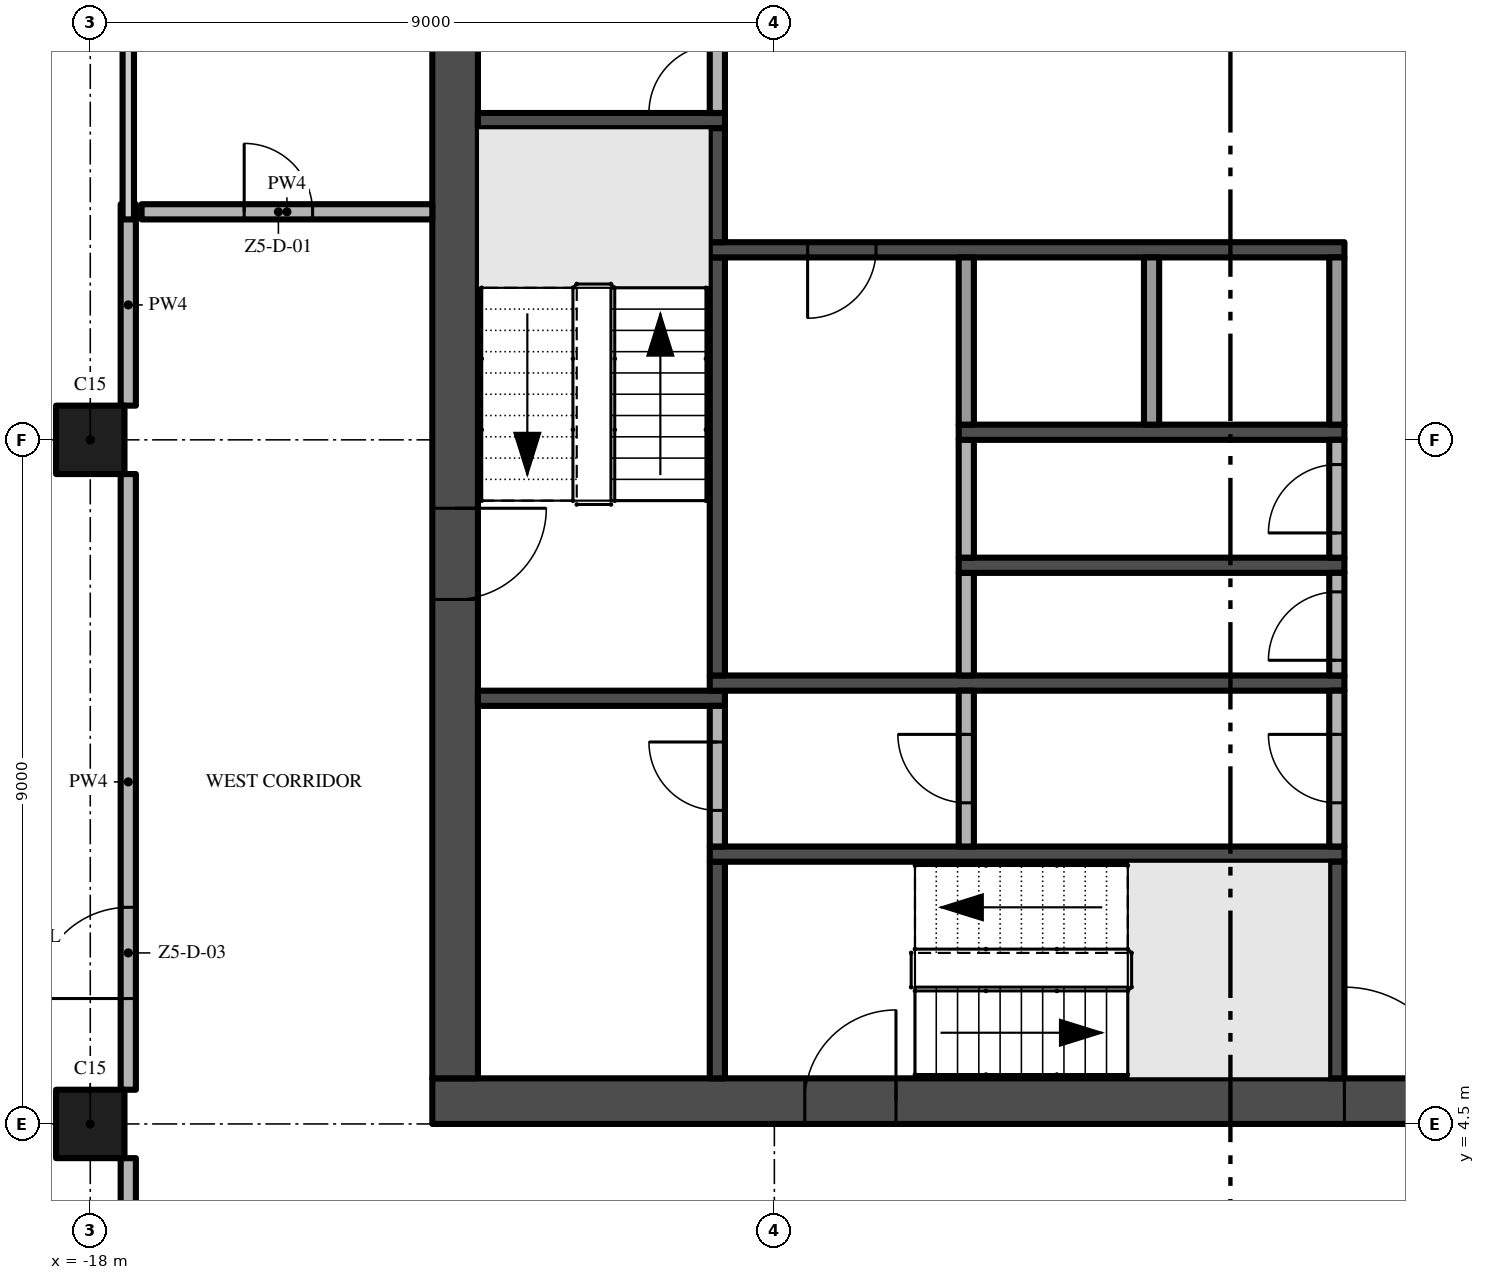
"""IFC4 building model, lengths in metres.
Left out: names, types, materials, properties, quantities, classifications, styles, units other than length and angle.
Written with IfcOpenShell. Run it as: python <this file> out.ifc"""

import sys

from ifc_helpers import new_model, si_unit, direction, frame, frame_2d, origin, origin_2d, place, context, subcontext, project, spatial, rectangle, extrude, element, fill, save


model = new_model("IFC4")
c1 = context("Model", 3, precision=1e-05, world=origin(), true_north=direction((0.0, 1.0)))
c2 = subcontext(c1, "Body", "Model", "MODEL_VIEW")
j1 = project(units=[si_unit("LENGTHUNIT", "METRE"), si_unit("PLANEANGLEUNIT", "RADIAN")], contexts=[c1])
p1 = place(None, origin())
s1 = spatial("IfcSite", under=j1, at=p1, CompositionType="ELEMENT")
p2 = place(p1, origin())
s2 = spatial("IfcBuilding", under=s1, at=p2, CompositionType="ELEMENT")
p3 = place(p2, frame((0.0, 0.0, 276.8)))
s3 = spatial("IfcBuildingStorey", under=s2, at=p3, CompositionType="ELEMENT", Elevation=276.8)
p4 = place(p3, frame((-13.5, 4.8, -0.3), z_axis=(0.0, 0.0, 1.0), x_axis=(1.0, 0.0, 0.0)))
e1 = element("IfcWall", 1, at=p4, inside=s3, PredefinedType="SHEAR", context=c2, shape_type="SweptSolid", body=[
    extrude(rectangle(XDim=27.0, YDim=0.6, at=frame_2d((13.5, 0.0))), origin(), (0.0, 0.0, 1.0), 3.8),
])
p5 = place(p4, frame((12.0, 0.0, 0.3)))
e2 = element("IfcOpeningElement", 2, at=p5, cuts=e1, PredefinedType="OPENING", context=c2, shape_type="SweptSolid", body=[
    extrude(rectangle(XDim=3.0, YDim=2.4, at=frame_2d((1.5, 1.2))), frame((0.0, 0.31, 0.0), z_axis=(0.0, -1.0, 0.0), x_axis=(1.0, 0.0, 0.0)), (0.0, 0.0, 1.0), 0.62),
])
p6 = place(p4, frame((4.9, 0.0, 0.3)))
e3 = element("IfcOpeningElement", 3, at=p6, cuts=e1, PredefinedType="OPENING", context=c2, shape_type="SweptSolid", body=[
    extrude(rectangle(XDim=1.2, YDim=2.2, at=frame_2d((0.6, 1.1))), frame((0.0, 0.31, 0.0), z_axis=(0.0, -1.0, 0.0), x_axis=(1.0, 0.0, 0.0)), (0.0, 0.0, 1.0), 0.62),
])
p7 = place(p4, frame((20.75, 0.0, 0.3)))
e4 = element("IfcOpeningElement", 4, at=p7, cuts=e1, PredefinedType="OPENING", context=c2, shape_type="SweptSolid", body=[
    extrude(rectangle(XDim=1.5, YDim=2.2, at=frame_2d((0.75, 1.1))), frame((0.0, 0.31, 0.0), z_axis=(0.0, -1.0, 0.0), x_axis=(1.0, 0.0, 0.0)), (0.0, 0.0, 1.0), 0.62),
])
p8 = place(p4, frame((17.4, 0.0, 0.3)))
e5 = element("IfcOpeningElement", 5, at=p8, cuts=e1, PredefinedType="OPENING", context=c2, shape_type="SweptSolid", body=[
    extrude(rectangle(XDim=1.2, YDim=2.2, at=frame_2d((0.6, 1.1))), frame((0.0, 0.31, 0.0), z_axis=(0.0, -1.0, 0.0), x_axis=(1.0, 0.0, 0.0)), (0.0, 0.0, 1.0), 0.62),
])
p9 = place(p3, frame((-13.2, 21.9, -0.3), z_axis=(0.0, 0.0, 1.0), x_axis=(0.0, -1.0, 0.0)))
e6 = element("IfcWall", 6, at=p9, inside=s3, PredefinedType="SHEAR", context=c2, shape_type="SweptSolid", body=[
    extrude(rectangle(XDim=16.8, YDim=0.6, at=frame_2d((8.4, 0.0))), origin(), (0.0, 0.0, 1.0), 3.8),
])
p10 = place(p9, frame((9.3, 0.0, 0.3)))
e7 = element("IfcOpeningElement", 7, at=p10, cuts=e6, PredefinedType="OPENING", context=c2, shape_type="SweptSolid", body=[
    extrude(rectangle(XDim=1.2, YDim=2.2, at=frame_2d((0.6, 1.1))), frame((0.0, 0.31, 0.0), z_axis=(0.0, -1.0, 0.0), x_axis=(1.0, 0.0, 0.0)), (0.0, 0.0, 1.0), 0.62),
])
for number, where, z_axis, x_axis in (
    (8, (-18.0, 13.5, 0.0), (0.0, 0.0, 1.0), (1.0, 0.0, 0.0)),
    (9, (-18.0, 4.5, 0.0), (0.0, 0.0, 1.0), (1.0, 0.0, 0.0)),
):
    element("IfcColumn", number, at=place(p3, frame(where, z_axis=z_axis, x_axis=x_axis)), inside=s3, PredefinedType="COLUMN", context=c2, shape_type="SweptSolid", body=[
        extrude(rectangle(XDim=0.9, YDim=0.9, at=origin_2d()), origin(), (0.0, 0.0, 1.0), 3.5),
    ])
for number, where, z_axis, x_axis in (
    (10, (-12.9, 10.1, 0.0), (0.0, 0.0, 1.0), (1.0, 0.0, 0.0)),
    (11, (-12.9, 17.7, 0.0), (0.0, 0.0, 1.0), (1.0, 0.0, 0.0)),
):
    element("IfcWall", number, at=place(p3, frame(where, z_axis=z_axis, x_axis=x_axis)), inside=s3, PredefinedType="SHEAR", context=c2, shape_type="SweptSolid", body=[
        extrude(rectangle(XDim=3.25, YDim=0.2, at=frame_2d((1.625, 0.0))), origin(), (0.0, 0.0, 1.0), 3.5),
    ])
p11 = place(p3, frame((-9.75, 5.1, 0.0), z_axis=(0.0, 0.0, 1.0), x_axis=(0.0, 1.0, 0.0)))
e12 = element("IfcWall", 12, at=p11, inside=s3, PredefinedType="SHEAR", context=c2, shape_type="SweptSolid", body=[
    extrude(rectangle(XDim=2.85, YDim=0.2, at=frame_2d((1.425, 0.0))), origin(), (0.0, 0.0, 1.0), 3.5),
])
p12 = place(p3, frame((-9.85, 8.05, 0.0), z_axis=(0.0, 0.0, 1.0), x_axis=(1.0, 0.0, 0.0)))
e13 = element("IfcWall", 13, at=p12, inside=s3, PredefinedType="SHEAR", context=c2, shape_type="SweptSolid", body=[
    extrude(rectangle(XDim=8.35, YDim=0.2, at=frame_2d((4.175, 0.0))), origin(), (0.0, 0.0, 1.0), 3.5),
])
p13 = place(p3, frame((-9.75, 8.15, 0.0), z_axis=(0.0, 0.0, 1.0), x_axis=(0.0, 1.0, 0.0)))
e14 = element("IfcWall", 14, at=p13, inside=s3, PredefinedType="PARTITIONING", context=c2, shape_type="SweptSolid", body=[
    extrude(rectangle(XDim=1.85, YDim=0.2, at=frame_2d((0.925, 0.0))), origin(), (0.0, 0.0, 1.0), 3.5),
])
p14 = place(p13, frame((0.475, 0.0, 0.0)))
e15 = element("IfcOpeningElement", 15, at=p14, cuts=e14, PredefinedType="OPENING", context=c2, shape_type="SweptSolid", body=[
    extrude(rectangle(XDim=0.9, YDim=2.1, at=frame_2d((0.45, 1.05))), frame((0.0, 0.11, 0.0), z_axis=(0.0, -1.0, 0.0), x_axis=(1.0, 0.0, 0.0)), (0.0, 0.0, 1.0), 0.22),
])
p15 = place(p3, frame((-9.85, 10.3, 0.0), z_axis=(0.0, 0.0, 1.0), x_axis=(1.0, 0.0, 0.0)))
e16 = element("IfcWall", 16, at=p15, inside=s3, PredefinedType="SHEAR", context=c2, shape_type="SweptSolid", body=[
    extrude(rectangle(XDim=8.35, YDim=0.2, at=frame_2d((4.175, 0.0))), origin(), (0.0, 0.0, 1.0), 3.5),
])
p16 = place(p3, frame((-9.75, 10.4, 0.0), z_axis=(0.0, 0.0, 1.0), x_axis=(0.0, 1.0, 0.0)))
e17 = element("IfcWall", 17, at=p16, inside=s3, PredefinedType="SHEAR", context=c2, shape_type="SweptSolid", body=[
    extrude(rectangle(XDim=5.5, YDim=0.2, at=frame_2d((2.75, 0.0))), origin(), (0.0, 0.0, 1.0), 3.5),
])
p17 = place(p3, frame((-1.5, 16.0, 0.0), z_axis=(0.0, 0.0, 1.0), x_axis=(-1.0, 0.0, 0.0)))
e18 = element("IfcWall", 18, at=p17, inside=s3, PredefinedType="SHEAR", context=c2, shape_type="SweptSolid", body=[
    extrude(rectangle(XDim=8.35, YDim=0.2, at=frame_2d((4.175, 0.0))), origin(), (0.0, 0.0, 1.0), 3.5),
])
p18 = place(p17, frame((6.162, 0.0, 0.0)))
e19 = element("IfcOpeningElement", 19, at=p18, cuts=e18, PredefinedType="OPENING", context=c2, shape_type="SweptSolid", body=[
    extrude(rectangle(XDim=0.9, YDim=2.1, at=frame_2d((0.45, 1.05))), frame((0.0, 0.11, 0.0), z_axis=(0.0, -1.0, 0.0), x_axis=(1.0, 0.0, 0.0)), (0.0, 0.0, 1.0), 0.22),
])
p19 = place(p3, frame((-9.75, 16.1, 0.0), z_axis=(0.0, 0.0, 1.0), x_axis=(0.0, 1.0, 0.0)))
e20 = element("IfcWall", 20, at=p19, inside=s3, PredefinedType="SHEAR", context=c2, shape_type="SweptSolid", body=[
    extrude(rectangle(XDim=1.5, YDim=0.2, at=frame_2d((0.75, 0.0))), origin(), (0.0, 0.0, 1.0), 3.5),
])
p20 = place(p3, frame((-9.75, 17.8, 0.0), z_axis=(0.0, 0.0, 1.0), x_axis=(0.0, 1.0, 0.0)))
e21 = element("IfcWall", 21, at=p20, inside=s3, PredefinedType="PARTITIONING", context=c2, shape_type="SweptSolid", body=[
    extrude(rectangle(XDim=1.4, YDim=0.2, at=frame_2d((0.7, 0.0))), origin(), (0.0, 0.0, 1.0), 3.5),
])
p21 = place(p20, origin())
e22 = element("IfcOpeningElement", 22, at=p21, cuts=e21, PredefinedType="OPENING", context=c2, shape_type="SweptSolid", body=[
    extrude(rectangle(XDim=0.9, YDim=2.1, at=frame_2d((0.45, 1.05))), frame((0.0, 0.11, 0.0), z_axis=(0.0, -1.0, 0.0), x_axis=(1.0, 0.0, 0.0)), (0.0, 0.0, 1.0), 0.22),
])
p22 = place(p3, frame((-6.475, 8.15, 0.0), z_axis=(0.0, 0.0, 1.0), x_axis=(0.0, 1.0, 0.0)))
e23 = element("IfcWall", 23, at=p22, inside=s3, PredefinedType="PARTITIONING", context=c2, shape_type="SweptSolid", body=[
    extrude(rectangle(XDim=2.05, YDim=0.2, at=frame_2d((1.025, 0.0))), origin(), (0.0, 0.0, 1.0), 3.5),
])
p23 = place(p22, frame((0.575, 0.0, 0.0)))
e24 = element("IfcOpeningElement", 24, at=p23, cuts=e23, PredefinedType="OPENING", context=c2, shape_type="SweptSolid", body=[
    extrude(rectangle(XDim=0.9, YDim=2.1, at=frame_2d((0.45, 1.05))), frame((0.0, 0.11, 0.0), z_axis=(0.0, -1.0, 0.0), x_axis=(1.0, 0.0, 0.0)), (0.0, 0.0, 1.0), 0.22),
])
p24 = place(p3, frame((-6.475, 10.4, 0.0), z_axis=(0.0, 0.0, 1.0), x_axis=(0.0, 1.0, 0.0)))
e25 = element("IfcWall", 25, at=p24, inside=s3, PredefinedType="PARTITIONING", context=c2, shape_type="SweptSolid", body=[
    extrude(rectangle(XDim=1.35, YDim=0.2, at=frame_2d((0.675, 0.0))), origin(), (0.0, 0.0, 1.0), 3.5),
])
p25 = place(p3, frame((-6.575, 11.85, 0.0), z_axis=(0.0, 0.0, 1.0), x_axis=(1.0, 0.0, 0.0)))
e26 = element("IfcWall", 26, at=p25, inside=s3, PredefinedType="SHEAR", context=c2, shape_type="SweptSolid", body=[
    extrude(rectangle(XDim=5.075, YDim=0.2, at=frame_2d((2.538, 0.0))), origin(), (0.0, 0.0, 1.0), 3.5),
])
p26 = place(p3, frame((-6.475, 11.95, 0.0), z_axis=(0.0, 0.0, 1.0), x_axis=(0.0, 1.0, 0.0)))
e27 = element("IfcWall", 27, at=p26, inside=s3, PredefinedType="PARTITIONING", context=c2, shape_type="SweptSolid", body=[
    extrude(rectangle(XDim=1.55, YDim=0.2, at=frame_2d((0.775, 0.0))), origin(), (0.0, 0.0, 1.0), 3.5),
])
p27 = place(p3, frame((-6.575, 13.6, 0.0), z_axis=(0.0, 0.0, 1.0), x_axis=(1.0, 0.0, 0.0)))
e28 = element("IfcWall", 28, at=p27, inside=s3, PredefinedType="SHEAR", context=c2, shape_type="SweptSolid", body=[
    extrude(rectangle(XDim=5.075, YDim=0.2, at=frame_2d((2.538, 0.0))), origin(), (0.0, 0.0, 1.0), 3.5),
])
for number, where, z_axis, x_axis in (
    (29, (-6.475, 13.7, 0.0), (0.0, 0.0, 1.0), (0.0, 1.0, 0.0)),
    (30, (-4.037, 13.7, 0.0), (0.0, 0.0, 1.0), (0.0, 1.0, 0.0)),
):
    element("IfcWall", number, at=place(p3, frame(where, z_axis=z_axis, x_axis=x_axis)), inside=s3, PredefinedType="PARTITIONING", context=c2, shape_type="SweptSolid", body=[
        extrude(rectangle(XDim=2.2, YDim=0.2, at=frame_2d((1.1, 0.0))), origin(), (0.0, 0.0, 1.0), 3.5),
    ])
p28 = place(p3, frame((-1.6, 5.1, 0.0), z_axis=(0.0, 0.0, 1.0), x_axis=(0.0, 1.0, 0.0)))
e31 = element("IfcWall", 31, at=p28, inside=s3, PredefinedType="SHEAR", context=c2, shape_type="SweptSolid", body=[
    extrude(rectangle(XDim=2.85, YDim=0.2, at=frame_2d((1.425, 0.0))), origin(), (0.0, 0.0, 1.0), 3.5),
])
p29 = place(p3, frame((-1.6, 8.15, 0.0), z_axis=(0.0, 0.0, 1.0), x_axis=(0.0, 1.0, 0.0)))
e32 = element("IfcWall", 32, at=p29, inside=s3, PredefinedType="PARTITIONING", context=c2, shape_type="SweptSolid", body=[
    extrude(rectangle(XDim=2.05, YDim=0.2, at=frame_2d((1.025, 0.0))), origin(), (0.0, 0.0, 1.0), 3.5),
])
p30 = place(p29, frame((0.575, 0.0, 0.0)))
e33 = element("IfcOpeningElement", 33, at=p30, cuts=e32, PredefinedType="OPENING", context=c2, shape_type="SweptSolid", body=[
    extrude(rectangle(XDim=0.9, YDim=2.1, at=frame_2d((0.45, 1.05))), frame((0.0, 0.11, 0.0), z_axis=(0.0, -1.0, 0.0), x_axis=(1.0, 0.0, 0.0)), (0.0, 0.0, 1.0), 0.22),
])
p31 = place(p3, frame((-1.6, 10.4, 0.0), z_axis=(0.0, 0.0, 1.0), x_axis=(0.0, 1.0, 0.0)))
e34 = element("IfcWall", 34, at=p31, inside=s3, PredefinedType="PARTITIONING", context=c2, shape_type="SweptSolid", body=[
    extrude(rectangle(XDim=1.35, YDim=0.2, at=frame_2d((0.675, 0.0))), origin(), (0.0, 0.0, 1.0), 3.5),
])
p32 = place(p31, frame((0.2, 0.0, 0.0)))
e35 = element("IfcOpeningElement", 35, at=p32, cuts=e34, PredefinedType="OPENING", context=c2, shape_type="SweptSolid", body=[
    extrude(rectangle(XDim=0.9, YDim=2.1, at=frame_2d((0.45, 1.05))), frame((0.0, 0.11, 0.0), z_axis=(0.0, -1.0, 0.0), x_axis=(1.0, 0.0, 0.0)), (0.0, 0.0, 1.0), 0.22),
])
p33 = place(p3, frame((-1.6, 11.95, 0.0), z_axis=(0.0, 0.0, 1.0), x_axis=(0.0, 1.0, 0.0)))
e36 = element("IfcWall", 36, at=p33, inside=s3, PredefinedType="PARTITIONING", context=c2, shape_type="SweptSolid", body=[
    extrude(rectangle(XDim=1.55, YDim=0.2, at=frame_2d((0.775, 0.0))), origin(), (0.0, 0.0, 1.0), 3.5),
])
p34 = place(p33, frame((0.325, 0.0, 0.0)))
e37 = element("IfcOpeningElement", 37, at=p34, cuts=e36, PredefinedType="OPENING", context=c2, shape_type="SweptSolid", body=[
    extrude(rectangle(XDim=0.9, YDim=2.1, at=frame_2d((0.45, 1.05))), frame((0.0, 0.11, 0.0), z_axis=(0.0, -1.0, 0.0), x_axis=(1.0, 0.0, 0.0)), (0.0, 0.0, 1.0), 0.22),
])
p35 = place(p3, frame((-1.6, 13.7, 0.0), z_axis=(0.0, 0.0, 1.0), x_axis=(0.0, 1.0, 0.0)))
e38 = element("IfcWall", 38, at=p35, inside=s3, PredefinedType="PARTITIONING", context=c2, shape_type="SweptSolid", body=[
    extrude(rectangle(XDim=2.2, YDim=0.2, at=frame_2d((1.1, 0.0))), origin(), (0.0, 0.0, 1.0), 3.5),
])
p36 = place(p3, frame((-17.325, 16.5, 0.0), z_axis=(0.0, 0.0, 1.0), x_axis=(1.0, 0.0, 0.0)))
e39 = element("IfcWall", 39, at=p36, inside=s3, PredefinedType="PARTITIONING", context=c2, shape_type="SweptSolid", body=[
    extrude(rectangle(XDim=3.825, YDim=0.2, at=frame_2d((1.913, 0.0))), origin(), (0.0, 0.0, 1.0), 3.5),
])
p37 = place(p36, frame((1.35, 0.0, 0.0)))
e40 = element("IfcOpeningElement", 40, at=p37, cuts=e39, PredefinedType="OPENING", context=c2, shape_type="SweptSolid", body=[
    extrude(rectangle(XDim=0.9, YDim=2.1, at=frame_2d((0.45, 1.05))), frame((0.0, 0.11, 0.0), z_axis=(0.0, -1.0, 0.0), x_axis=(1.0, 0.0, 0.0)), (0.0, 0.0, 1.0), 0.22),
])
p38 = place(p3, frame((-17.5, -0.2, 0.0), z_axis=(0.0, 0.0, 1.0), x_axis=(0.0, 1.0, 0.0)))
e41 = element("IfcWall", 41, at=p38, inside=s3, PredefinedType="PARTITIONING", context=c2, shape_type="SweptSolid", body=[
    extrude(rectangle(XDim=4.25, YDim=0.2, at=frame_2d((2.125, 0.0))), origin(), (0.0, 0.0, 1.0), 3.5),
])
p39 = place(p3, frame((-17.5, 4.95, 0.0), z_axis=(0.0, 0.0, 1.0), x_axis=(0.0, 1.0, 0.0)))
e42 = element("IfcWall", 42, at=p39, inside=s3, PredefinedType="PARTITIONING", context=c2, shape_type="SweptSolid", body=[
    extrude(rectangle(XDim=8.1, YDim=0.2, at=frame_2d((4.05, 0.0))), origin(), (0.0, 0.0, 1.0), 3.5),
])
p40 = place(p39, frame((1.2, 0.0, 0.0)))
e43 = element("IfcOpeningElement", 43, at=p40, cuts=e42, PredefinedType="OPENING", context=c2, shape_type="SweptSolid", body=[
    extrude(rectangle(XDim=1.2, YDim=2.4, at=frame_2d((0.6, 1.2))), frame((0.0, 0.11, 0.0), z_axis=(0.0, -1.0, 0.0), x_axis=(1.0, 0.0, 0.0)), (0.0, 0.0, 1.0), 0.22),
])
p41 = place(p3, frame((-17.5, 13.95, 0.0), z_axis=(0.0, 0.0, 1.0), x_axis=(0.0, 1.0, 0.0)))
e44 = element("IfcWall", 44, at=p41, inside=s3, PredefinedType="PARTITIONING", context=c2, shape_type="SweptSolid", body=[
    extrude(rectangle(XDim=2.65, YDim=0.2, at=frame_2d((1.325, 0.0))), origin(), (0.0, 0.0, 1.0), 3.5),
])
p42 = place(p3, frame((-17.5, 16.4, 0.0), z_axis=(0.0, 0.0, 1.0), x_axis=(0.0, 1.0, 0.0)))
e45 = element("IfcWall", 45, at=p42, inside=s3, PredefinedType="PARTITIONING", context=c2, shape_type="SweptSolid", body=[
    extrude(rectangle(XDim=5.2, YDim=0.15, at=frame_2d((2.6, 0.0))), origin(), (0.0, 0.0, 1.0), 3.5),
])
p43 = place(p5, frame((3.0, 0.0, 0.0), z_axis=(0.0, 0.0, 1.0), x_axis=(-1.0, 0.0, 0.0)))
e46 = element("IfcDoor", 46, at=p43, inside=s3, OperationType="DOUBLE_DOOR_SINGLE_SWING", PredefinedType="DOOR", context=c2, shape_type="SweptSolid", body=[
    extrude(rectangle(XDim=3.0, YDim=2.4, at=frame_2d((1.5, 1.2))), frame((0.0, 0.025, 0.0), z_axis=(0.0, -1.0, 0.0), x_axis=(1.0, 0.0, 0.0)), (0.0, 0.0, 1.0), 0.05),
])
fill(e2, e46)
p44 = place(p10, frame((1.2, 0.0, 0.0), z_axis=(0.0, 0.0, 1.0), x_axis=(-1.0, 0.0, 0.0)))
e47 = element("IfcDoor", 47, at=p44, inside=s3, OperationType="SINGLE_SWING_RIGHT", PredefinedType="DOOR", context=c2, shape_type="SweptSolid", body=[
    extrude(rectangle(XDim=1.2, YDim=2.2, at=frame_2d((0.6, 1.1))), frame((0.0, 0.025, 0.0), z_axis=(0.0, -1.0, 0.0), x_axis=(1.0, 0.0, 0.0)), (0.0, 0.0, 1.0), 0.05),
])
fill(e7, e47)
p45 = place(p6, frame((1.2, 0.0, 0.0), z_axis=(0.0, 0.0, 1.0), x_axis=(-1.0, 0.0, 0.0)))
e48 = element("IfcDoor", 48, at=p45, inside=s3, OperationType="SINGLE_SWING_LEFT", PredefinedType="DOOR", context=c2, shape_type="SweptSolid", body=[
    extrude(rectangle(XDim=1.2, YDim=2.2, at=frame_2d((0.6, 1.1))), frame((0.0, 0.025, 0.0), z_axis=(0.0, -1.0, 0.0), x_axis=(1.0, 0.0, 0.0)), (0.0, 0.0, 1.0), 0.05),
])
fill(e3, e48)
p46 = place(p18, origin())
e49 = element("IfcDoor", 49, at=p46, inside=s3, OperationType="SINGLE_SWING_RIGHT", PredefinedType="DOOR", context=c2, shape_type="SweptSolid", body=[
    extrude(rectangle(XDim=0.9, YDim=2.1, at=frame_2d((0.45, 1.05))), frame((0.0, 0.025, 0.0), z_axis=(0.0, -1.0, 0.0), x_axis=(1.0, 0.0, 0.0)), (0.0, 0.0, 1.0), 0.05),
])
fill(e19, e49)
p47 = place(p30, origin())
e50 = element("IfcDoor", 50, at=p47, inside=s3, OperationType="SINGLE_SWING_RIGHT", PredefinedType="DOOR", context=c2, shape_type="SweptSolid", body=[
    extrude(rectangle(XDim=0.9, YDim=2.1, at=frame_2d((0.45, 1.05))), frame((0.0, 0.025, 0.0), z_axis=(0.0, -1.0, 0.0), x_axis=(1.0, 0.0, 0.0)), (0.0, 0.0, 1.0), 0.05),
])
fill(e33, e50)
p48 = place(p32, origin())
e51 = element("IfcDoor", 51, at=p48, inside=s3, OperationType="SINGLE_SWING_LEFT", PredefinedType="DOOR", context=c2, shape_type="SweptSolid", body=[
    extrude(rectangle(XDim=0.9, YDim=2.1, at=frame_2d((0.45, 1.05))), frame((0.0, 0.025, 0.0), z_axis=(0.0, -1.0, 0.0), x_axis=(1.0, 0.0, 0.0)), (0.0, 0.0, 1.0), 0.05),
])
fill(e35, e51)
p49 = place(p34, origin())
e52 = element("IfcDoor", 52, at=p49, inside=s3, OperationType="SINGLE_SWING_LEFT", PredefinedType="DOOR", context=c2, shape_type="SweptSolid", body=[
    extrude(rectangle(XDim=0.9, YDim=2.1, at=frame_2d((0.45, 1.05))), frame((0.0, 0.025, 0.0), z_axis=(0.0, -1.0, 0.0), x_axis=(1.0, 0.0, 0.0)), (0.0, 0.0, 1.0), 0.05),
])
fill(e37, e52)
p50 = place(p21, origin())
e53 = element("IfcDoor", 53, at=p50, inside=s3, OperationType="SINGLE_SWING_LEFT", PredefinedType="DOOR", context=c2, shape_type="SweptSolid", body=[
    extrude(rectangle(XDim=0.9, YDim=2.1, at=frame_2d((0.45, 1.05))), frame((0.0, 0.025, 0.0), z_axis=(0.0, -1.0, 0.0), x_axis=(1.0, 0.0, 0.0)), (0.0, 0.0, 1.0), 0.05),
])
fill(e22, e53)
p51 = place(p23, origin())
e54 = element("IfcDoor", 54, at=p51, inside=s3, OperationType="SINGLE_SWING_RIGHT", PredefinedType="DOOR", context=c2, shape_type="SweptSolid", body=[
    extrude(rectangle(XDim=0.9, YDim=2.1, at=frame_2d((0.45, 1.05))), frame((0.0, 0.025, 0.0), z_axis=(0.0, -1.0, 0.0), x_axis=(1.0, 0.0, 0.0)), (0.0, 0.0, 1.0), 0.05),
])
fill(e24, e54)
p52 = place(p14, origin())
e55 = element("IfcDoor", 55, at=p52, inside=s3, OperationType="SINGLE_SWING_RIGHT", PredefinedType="DOOR", context=c2, shape_type="SweptSolid", body=[
    extrude(rectangle(XDim=0.9, YDim=2.1, at=frame_2d((0.45, 1.05))), frame((0.0, 0.025, 0.0), z_axis=(0.0, -1.0, 0.0), x_axis=(1.0, 0.0, 0.0)), (0.0, 0.0, 1.0), 0.05),
])
fill(e15, e55)
p53 = place(p37, origin())
e56 = element("IfcDoor", 56, at=p53, inside=s3, OperationType="SINGLE_SWING_LEFT", PredefinedType="DOOR", context=c2, shape_type="SweptSolid", body=[
    extrude(rectangle(XDim=0.9, YDim=2.1, at=frame_2d((0.45, 1.05))), frame((0.0, 0.025, 0.0), z_axis=(0.0, -1.0, 0.0), x_axis=(1.0, 0.0, 0.0)), (0.0, 0.0, 1.0), 0.05),
])
fill(e40, e56)
p54 = place(p40, origin())
e57 = element("IfcDoor", 57, at=p54, inside=s3, OperationType="SINGLE_SWING_LEFT", PredefinedType="DOOR", context=c2, shape_type="SweptSolid", body=[
    extrude(rectangle(XDim=1.2, YDim=2.4, at=frame_2d((0.6, 1.2))), frame((0.0, 0.025, 0.0), z_axis=(0.0, -1.0, 0.0), x_axis=(1.0, 0.0, 0.0)), (0.0, 0.0, 1.0), 0.05),
])
fill(e43, e57)
save(model, sys.argv[1])
